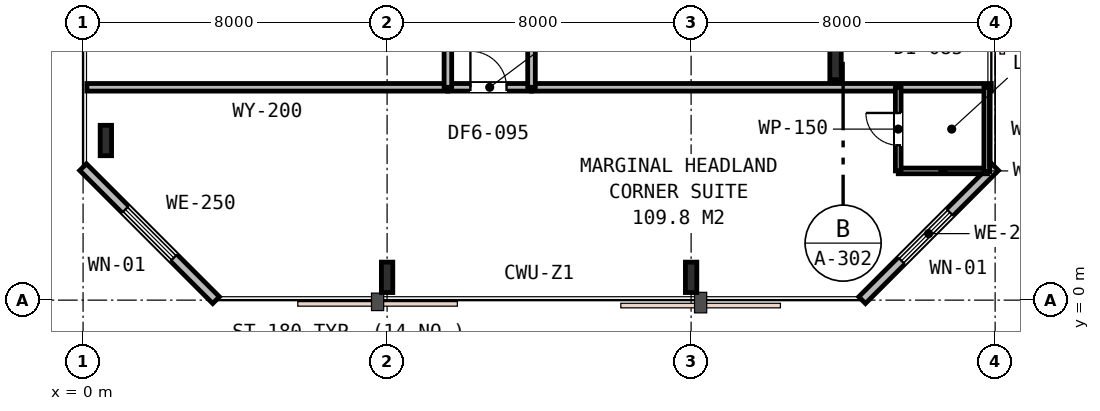
"""IFC4 building model, lengths in metres.
Left out: names, types, materials, properties, quantities, classifications, styles, units other than length and angle.
Written with IfcOpenShell. Run it as: python <this file> out.ifc"""

import sys

from ifc_helpers import new_model, si_unit, direction, frame, frame_2d, origin, origin_2d, place, context, subcontext, project, spatial, rectangle, i_section, extrude, element, fill, save


model = new_model("IFC4")
c1 = context("Model", 3, precision=1e-05, world=origin(), true_north=direction((0.0, 1.0)))
c2 = subcontext(c1, "Body", "Model", "MODEL_VIEW")
j1 = project(units=[si_unit("LENGTHUNIT", "METRE"), si_unit("PLANEANGLEUNIT", "RADIAN")], contexts=[c1])
p1 = place(None, origin())
s1 = spatial("IfcSite", under=j1, at=p1, CompositionType="ELEMENT")
p2 = place(p1, origin())
s2 = spatial("IfcBuilding", under=s1, at=p2, CompositionType="ELEMENT")
p3 = place(p2, frame((0.0, 0.0, 58.2)))
s3 = spatial("IfcBuildingStorey", under=s2, at=p3, CompositionType="ELEMENT", Elevation=58.2)
for number, where, z_axis, x_axis in (
    (1, (0.6, 4.2, 0.0), (0.0, 0.0, 1.0), (1.0, 0.0, 0.0)),
    (2, (8.0, 0.6, 0.0), (0.0, 0.0, 1.0), (1.0, 0.0, 0.0)),
    (3, (16.0, 0.6, 0.0), (0.0, 0.0, 1.0), (1.0, 0.0, 0.0)),
    (4, (19.8, 6.2, 0.0), (0.0, 0.0, 1.0), (1.0, 0.0, 0.0)),
):
    element("IfcColumn", number, at=place(p3, frame(where, z_axis=z_axis, x_axis=x_axis)), inside=s3, PredefinedType="COLUMN", context=c2, shape_type="SweptSolid", body=[
        extrude(i_section(OverallWidth=0.3, OverallDepth=0.8, WebThickness=0.018, FlangeThickness=0.033, FilletRadius=0.03, at=origin_2d()), origin(), (0.0, 0.0, 1.0), 3.6),
    ])
p4 = place(p3, frame((20.5, 0.0, 0.0), z_axis=(0.0, 0.0, 1.0), x_axis=(0.707106781187, 0.707106781187, 0.0)))
e5 = element("IfcWall", 5, at=p4, inside=s3, PredefinedType="STANDARD", context=c2, shape_type="SweptSolid", body=[
    extrude(rectangle(XDim=4.95, YDim=0.25, at=frame_2d((2.475, 0.0))), origin(), (0.0, 0.0, 1.0), 3.33),
])
p5 = place(p4, frame((1.465, 0.0, 0.75)))
e6 = element("IfcOpeningElement", 6, at=p5, cuts=e5, PredefinedType="OPENING", context=c2, shape_type="SweptSolid", body=[
    extrude(rectangle(XDim=1.8, YDim=1.85, at=frame_2d((0.9, 0.925))), frame((0.0, 0.135, 0.0), z_axis=(0.0, -1.0, 0.0), x_axis=(1.0, 0.0, 0.0)), (0.0, 0.0, 1.0), 0.27),
])
p6 = place(p3, frame((0.0, 3.5, 0.0), z_axis=(0.0, 0.0, 1.0), x_axis=(0.707106781187, -0.707106781187, 0.0)))
e7 = element("IfcWall", 7, at=p6, inside=s3, PredefinedType="STANDARD", context=c2, shape_type="SweptSolid", body=[
    extrude(rectangle(XDim=4.95, YDim=0.25, at=frame_2d((2.475, 0.0))), origin(), (0.0, 0.0, 1.0), 3.33),
])
p7 = place(p6, frame((1.575, 0.0, 0.75)))
e8 = element("IfcOpeningElement", 8, at=p7, cuts=e7, PredefinedType="OPENING", context=c2, shape_type="SweptSolid", body=[
    extrude(rectangle(XDim=1.8, YDim=1.85, at=frame_2d((0.9, 0.925))), frame((0.0, 0.135, 0.0), z_axis=(0.0, -1.0, 0.0), x_axis=(1.0, 0.0, 0.0)), (0.0, 0.0, 1.0), 0.27),
])
p8 = place(p3, frame((0.1, 5.6, 0.0), z_axis=(0.0, 0.0, 1.0), x_axis=(1.0, 0.0, 0.0)))
e9 = element("IfcWall", 9, at=p8, inside=s3, PredefinedType="PARTITIONING", context=c2, shape_type="SweptSolid", body=[
    extrude(rectangle(XDim=9.5, YDim=0.2, at=frame_2d((4.75, 0.0))), origin(), (0.0, 0.0, 1.0), 2.93),
])
p9 = place(p3, frame((11.8, 5.6, 0.0), z_axis=(0.0, 0.0, 1.0), x_axis=(1.0, 0.0, 0.0)))
e10 = element("IfcWall", 10, at=p9, inside=s3, PredefinedType="PARTITIONING", context=c2, shape_type="SweptSolid", body=[
    extrude(rectangle(XDim=12.1, YDim=0.2, at=frame_2d((6.05, 0.0))), origin(), (0.0, 0.0, 1.0), 2.82),
])
p10 = place(p3, frame((9.6, 5.6, 0.0), z_axis=(0.0, 0.0, 1.0), x_axis=(1.0, 0.0, 0.0)))
e11 = element("IfcWall", 11, at=p10, inside=s3, PredefinedType="PARTITIONING", context=c2, shape_type="SweptSolid", body=[
    extrude(rectangle(XDim=2.2, YDim=0.2, at=frame_2d((1.1, 0.0))), origin(), (0.0, 0.0, 1.0), 3.33),
])
p11 = place(p10, frame((0.593, 0.0, 0.0)))
e12 = element("IfcOpeningElement", 12, at=p11, cuts=e11, PredefinedType="OPENING", context=c2, shape_type="SweptSolid", body=[
    extrude(rectangle(XDim=0.95, YDim=2.15, at=frame_2d((0.475, 1.075))), frame((0.0, 0.11, 0.0), z_axis=(0.0, -1.0, 0.0), x_axis=(1.0, 0.0, 0.0)), (0.0, 0.0, 1.0), 0.22),
])
p12 = place(p3, frame((21.45, 3.4, 0.0), z_axis=(0.0, 0.0, 1.0), x_axis=(1.0, 0.0, 0.0)))
e13 = element("IfcWall", 13, at=p12, inside=s3, PredefinedType="PARTITIONING", context=c2, shape_type="SweptSolid", body=[
    extrude(rectangle(XDim=2.35, YDim=0.15, at=frame_2d((1.175, 0.0))), origin(), (0.0, 0.0, 1.0), 3.33),
])
p13 = place(p3, frame((21.45, 3.4, 0.0), z_axis=(0.0, 0.0, 1.0), x_axis=(0.0, 1.0, 0.0)))
e14 = element("IfcWall", 14, at=p13, inside=s3, PredefinedType="PARTITIONING", context=c2, shape_type="SweptSolid", body=[
    extrude(rectangle(XDim=2.2, YDim=0.15, at=frame_2d((1.1, 0.0))), origin(), (0.0, 0.0, 1.0), 3.33),
])
p14 = place(p13, frame((0.675, 0.0, 0.0)))
e15 = element("IfcOpeningElement", 15, at=p14, cuts=e14, PredefinedType="OPENING", context=c2, shape_type="SweptSolid", body=[
    extrude(rectangle(XDim=0.85, YDim=2.15, at=frame_2d((0.425, 1.075))), frame((0.0, 0.085, 0.0), z_axis=(0.0, -1.0, 0.0), x_axis=(1.0, 0.0, 0.0)), (0.0, 0.0, 1.0), 0.17),
])
p15 = place(p3, frame((23.78, 5.6, 0.0), z_axis=(0.0, 0.0, 1.0), x_axis=(0.0, -1.0, 0.0)))
e16 = element("IfcWall", 16, at=p15, inside=s3, PredefinedType="PARTITIONING", context=c2, shape_type="SweptSolid", body=[
    extrude(rectangle(XDim=2.22, YDim=0.15, at=frame_2d((1.11, 0.0))), origin(), (0.0, 0.0, 1.0), 3.33),
])
p16 = place(p3, frame((9.6, 5.6, 0.0), z_axis=(0.0, 0.0, 1.0), x_axis=(0.0, 1.0, 0.0)))
e17 = element("IfcWall", 17, at=p16, inside=s3, PredefinedType="PARTITIONING", context=c2, shape_type="SweptSolid", body=[
    extrude(rectangle(XDim=23.0, YDim=0.2, at=frame_2d((11.5, 0.0))), origin(), (0.0, 0.0, 1.0), 2.82),
])
p17 = place(p16, frame((4.27, 0.0, 0.0)))
e18 = element("IfcOpeningElement", 18, at=p17, cuts=e17, PredefinedType="OPENING", context=c2, shape_type="SweptSolid", body=[
    extrude(rectangle(XDim=0.95, YDim=2.15, at=frame_2d((0.475, 1.075))), frame((0.0, 0.11, 0.0), z_axis=(0.0, -1.0, 0.0), x_axis=(1.0, 0.0, 0.0)), (0.0, 0.0, 1.0), 0.22),
])
p18 = place(p16, frame((10.17, 0.0, 0.0)))
e19 = element("IfcOpeningElement", 19, at=p18, cuts=e17, PredefinedType="OPENING", context=c2, shape_type="SweptSolid", body=[
    extrude(rectangle(XDim=0.95, YDim=2.15, at=frame_2d((0.475, 1.075))), frame((0.0, 0.11, 0.0), z_axis=(0.0, -1.0, 0.0), x_axis=(1.0, 0.0, 0.0)), (0.0, 0.0, 1.0), 0.22),
])
p19 = place(p16, frame((19.693, 0.0, 0.0)))
e20 = element("IfcOpeningElement", 20, at=p19, cuts=e17, PredefinedType="OPENING", context=c2, shape_type="SweptSolid", body=[
    extrude(rectangle(XDim=0.95, YDim=2.15, at=frame_2d((0.475, 1.075))), frame((0.0, 0.11, 0.0), z_axis=(0.0, -1.0, 0.0), x_axis=(1.0, 0.0, 0.0)), (0.0, 0.0, 1.0), 0.22),
])
p20 = place(p3, frame((11.8, 5.6, 0.0), z_axis=(0.0, 0.0, 1.0), x_axis=(0.0, 1.0, 0.0)))
e21 = element("IfcWall", 21, at=p20, inside=s3, PredefinedType="PARTITIONING", context=c2, shape_type="SweptSolid", body=[
    extrude(rectangle(XDim=23.0, YDim=0.2, at=frame_2d((11.5, 0.0))), origin(), (0.0, 0.0, 1.0), 2.82),
])
p21 = place(p20, frame((2.19, 0.0, 0.0)))
e22 = element("IfcOpeningElement", 22, at=p21, cuts=e21, PredefinedType="OPENING", context=c2, shape_type="SweptSolid", body=[
    extrude(rectangle(XDim=0.95, YDim=2.15, at=frame_2d((0.475, 1.075))), frame((0.0, 0.11, 0.0), z_axis=(0.0, -1.0, 0.0), x_axis=(1.0, 0.0, 0.0)), (0.0, 0.0, 1.0), 0.22),
])
p22 = place(p20, frame((9.92, 0.0, 0.0)))
e23 = element("IfcOpeningElement", 23, at=p22, cuts=e21, PredefinedType="OPENING", context=c2, shape_type="SweptSolid", body=[
    extrude(rectangle(XDim=0.95, YDim=2.15, at=frame_2d((0.475, 1.075))), frame((0.0, 0.11, 0.0), z_axis=(0.0, -1.0, 0.0), x_axis=(1.0, 0.0, 0.0)), (0.0, 0.0, 1.0), 0.22),
])
p23 = place(p20, frame((17.41, 0.0, 0.0)))
e24 = element("IfcOpeningElement", 24, at=p23, cuts=e21, PredefinedType="OPENING", context=c2, shape_type="SweptSolid", body=[
    extrude(rectangle(XDim=0.95, YDim=2.15, at=frame_2d((0.475, 1.075))), frame((0.0, 0.11, 0.0), z_axis=(0.0, -1.0, 0.0), x_axis=(1.0, 0.0, 0.0)), (0.0, 0.0, 1.0), 0.22),
])
p24 = place(p5, origin())
e25 = element("IfcWindow", 25, at=p24, inside=s3, PartitioningType="SINGLE_PANEL", PredefinedType="WINDOW", context=c2, shape_type="SweptSolid", body=[
    extrude(rectangle(XDim=1.8, YDim=1.85, at=frame_2d((0.9, 0.925))), frame((0.0, 0.03, 0.0), z_axis=(0.0, -1.0, 0.0), x_axis=(1.0, 0.0, 0.0)), (0.0, 0.0, 1.0), 0.06),
])
fill(e6, e25)
p25 = place(p7, origin())
e26 = element("IfcWindow", 26, at=p25, inside=s3, PartitioningType="SINGLE_PANEL", PredefinedType="WINDOW", context=c2, shape_type="SweptSolid", body=[
    extrude(rectangle(XDim=1.8, YDim=1.85, at=frame_2d((0.9, 0.925))), frame((0.0, 0.03, 0.0), z_axis=(0.0, -1.0, 0.0), x_axis=(1.0, 0.0, 0.0)), (0.0, 0.0, 1.0), 0.06),
])
fill(e8, e26)
p26 = place(p11, origin())
e27 = element("IfcDoor", 27, at=p26, inside=s3, OperationType="SINGLE_SWING_LEFT", PredefinedType="DOOR", context=c2, shape_type="SweptSolid", body=[
    extrude(rectangle(XDim=0.95, YDim=2.15, at=frame_2d((0.475, 1.075))), frame((0.0, 0.025, 0.0), z_axis=(0.0, -1.0, 0.0), x_axis=(1.0, 0.0, 0.0)), (0.0, 0.0, 1.0), 0.05),
])
fill(e12, e27)
p27 = place(p14, origin())
e28 = element("IfcDoor", 28, at=p27, inside=s3, OperationType="SINGLE_SWING_RIGHT", PredefinedType="DOOR", context=c2, shape_type="SweptSolid", body=[
    extrude(rectangle(XDim=0.85, YDim=2.15, at=frame_2d((0.425, 1.075))), frame((0.0, 0.025, 0.0), z_axis=(0.0, -1.0, 0.0), x_axis=(1.0, 0.0, 0.0)), (0.0, 0.0, 1.0), 0.05),
])
fill(e15, e28)
save(model, sys.argv[1])
